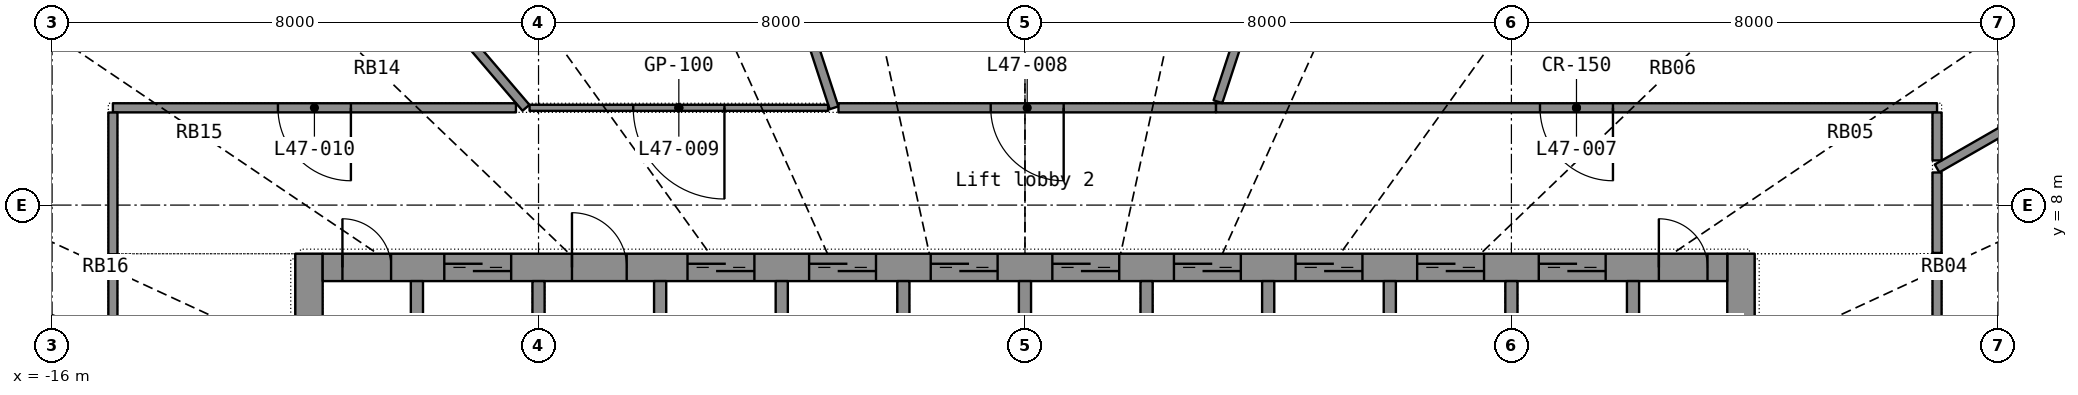
"""IFC4 building model, lengths in metres.
Left out: names, types, materials, properties, quantities, classifications, styles, units other than length and angle.
Written with IfcOpenShell. Run it as: python <this file> out.ifc"""

import sys

from ifc_helpers import new_model, si_unit, direction, frame, frame_2d, origin, place, context, subcontext, project, spatial, rectangle, extrude, element, fill, save


model = new_model("IFC4")
c1 = context("Model", 3, precision=1e-05, world=origin(), true_north=direction((0.0, 1.0)))
c2 = subcontext(c1, "Body", "Model", "MODEL_VIEW")
j1 = project(units=[si_unit("LENGTHUNIT", "METRE"), si_unit("PLANEANGLEUNIT", "RADIAN")], contexts=[c1])
p1 = place(None, origin())
s1 = spatial("IfcSite", under=j1, at=p1, CompositionType="ELEMENT")
p2 = place(p1, origin())
s2 = spatial("IfcBuilding", under=s1, at=p2, CompositionType="ELEMENT")
p3 = place(p2, frame((0.0, 0.0, 194.1)))
s3 = spatial("IfcBuildingStorey", under=s2, at=p3, CompositionType="ELEMENT", Elevation=194.1)
p4 = place(p3, frame((-11.775, -7.2, 0.0), z_axis=(0.0, 0.0, 1.0), x_axis=(0.0, 1.0, 0.0)))
e1 = element("IfcWall", 1, at=p4, inside=s3, PredefinedType="SHEAR", context=c2, shape_type="SweptSolid", body=[
    extrude(rectangle(XDim=14.4, YDim=0.45, at=frame_2d((7.2, 0.0))), origin(), (0.0, 0.0, 1.0), 3.3),
])
p5 = place(p4, frame((6.5, 0.0, 0.0)))
e2 = element("IfcOpeningElement", 2, at=p5, cuts=e1, PredefinedType="OPENING", context=c2, shape_type="SweptSolid", body=[
    extrude(rectangle(XDim=1.4, YDim=2.2, at=frame_2d((0.7, 1.1))), frame((0.0, 0.235, 0.0), z_axis=(0.0, -1.0, 0.0), x_axis=(1.0, 0.0, 0.0)), (0.0, 0.0, 1.0), 0.47),
])
p6 = place(p3, frame((11.775, -7.2, 0.0), z_axis=(0.0, 0.0, 1.0), x_axis=(0.0, 1.0, 0.0)))
e3 = element("IfcWall", 3, at=p6, inside=s3, PredefinedType="SHEAR", context=c2, shape_type="SweptSolid", body=[
    extrude(rectangle(XDim=14.4, YDim=0.45, at=frame_2d((7.2, 0.0))), origin(), (0.0, 0.0, 1.0), 3.3),
])
p7 = place(p6, frame((6.5, 0.0, 0.0)))
e4 = element("IfcOpeningElement", 4, at=p7, cuts=e3, PredefinedType="OPENING", context=c2, shape_type="SweptSolid", body=[
    extrude(rectangle(XDim=1.4, YDim=2.2, at=frame_2d((0.7, 1.1))), frame((0.0, 0.235, 0.0), z_axis=(0.0, -1.0, 0.0), x_axis=(1.0, 0.0, 0.0)), (0.0, 0.0, 1.0), 0.47),
])
p8 = place(p3, frame((-11.55, 6.975, 0.0), z_axis=(0.0, 0.0, 1.0), x_axis=(1.0, 0.0, 0.0)))
e5 = element("IfcWall", 5, at=p8, inside=s3, PredefinedType="SHEAR", context=c2, shape_type="SweptSolid", body=[
    extrude(rectangle(XDim=23.1, YDim=0.45, at=frame_2d((11.55, 0.0))), origin(), (0.0, 0.0, 1.0), 3.3),
])
p9 = place(p8, frame((2.0, 0.0, 0.0)))
e6 = element("IfcOpeningElement", 6, at=p9, cuts=e5, PredefinedType="OPENING", context=c2, shape_type="SweptSolid", body=[
    extrude(rectangle(XDim=1.1, YDim=2.2, at=frame_2d((0.55, 1.1))), frame((0.0, 0.235, 0.0), z_axis=(0.0, -1.0, 0.0), x_axis=(1.0, 0.0, 0.0)), (0.0, 0.0, 1.0), 0.47),
])
p10 = place(p8, frame((6.0, 0.0, 0.0)))
e7 = element("IfcOpeningElement", 7, at=p10, cuts=e5, PredefinedType="OPENING", context=c2, shape_type="SweptSolid", body=[
    extrude(rectangle(XDim=1.1, YDim=2.2, at=frame_2d((0.55, 1.1))), frame((0.0, 0.235, 0.0), z_axis=(0.0, -1.0, 0.0), x_axis=(1.0, 0.0, 0.0)), (0.0, 0.0, 1.0), 0.47),
])
p11 = place(p8, frame((8.0, 0.0, 0.0)))
e8 = element("IfcOpeningElement", 8, at=p11, cuts=e5, PredefinedType="OPENING", context=c2, shape_type="SweptSolid", body=[
    extrude(rectangle(XDim=1.1, YDim=2.2, at=frame_2d((0.55, 1.1))), frame((0.0, 0.235, 0.0), z_axis=(0.0, -1.0, 0.0), x_axis=(1.0, 0.0, 0.0)), (0.0, 0.0, 1.0), 0.47),
])
p12 = place(p8, frame((10.0, 0.0, 0.0)))
e9 = element("IfcOpeningElement", 9, at=p12, cuts=e5, PredefinedType="OPENING", context=c2, shape_type="SweptSolid", body=[
    extrude(rectangle(XDim=1.1, YDim=2.2, at=frame_2d((0.55, 1.1))), frame((0.0, 0.235, 0.0), z_axis=(0.0, -1.0, 0.0), x_axis=(1.0, 0.0, 0.0)), (0.0, 0.0, 1.0), 0.47),
])
p13 = place(p8, frame((12.0, 0.0, 0.0)))
e10 = element("IfcOpeningElement", 10, at=p13, cuts=e5, PredefinedType="OPENING", context=c2, shape_type="SweptSolid", body=[
    extrude(rectangle(XDim=1.1, YDim=2.2, at=frame_2d((0.55, 1.1))), frame((0.0, 0.235, 0.0), z_axis=(0.0, -1.0, 0.0), x_axis=(1.0, 0.0, 0.0)), (0.0, 0.0, 1.0), 0.47),
])
p14 = place(p8, frame((14.0, 0.0, 0.0)))
e11 = element("IfcOpeningElement", 11, at=p14, cuts=e5, PredefinedType="OPENING", context=c2, shape_type="SweptSolid", body=[
    extrude(rectangle(XDim=1.1, YDim=2.2, at=frame_2d((0.55, 1.1))), frame((0.0, 0.235, 0.0), z_axis=(0.0, -1.0, 0.0), x_axis=(1.0, 0.0, 0.0)), (0.0, 0.0, 1.0), 0.47),
])
p15 = place(p8, frame((16.0, 0.0, 0.0)))
e12 = element("IfcOpeningElement", 12, at=p15, cuts=e5, PredefinedType="OPENING", context=c2, shape_type="SweptSolid", body=[
    extrude(rectangle(XDim=1.1, YDim=2.2, at=frame_2d((0.55, 1.1))), frame((0.0, 0.235, 0.0), z_axis=(0.0, -1.0, 0.0), x_axis=(1.0, 0.0, 0.0)), (0.0, 0.0, 1.0), 0.47),
])
p16 = place(p8, frame((18.0, 0.0, 0.0)))
e13 = element("IfcOpeningElement", 13, at=p16, cuts=e5, PredefinedType="OPENING", context=c2, shape_type="SweptSolid", body=[
    extrude(rectangle(XDim=1.1, YDim=2.2, at=frame_2d((0.55, 1.1))), frame((0.0, 0.235, 0.0), z_axis=(0.0, -1.0, 0.0), x_axis=(1.0, 0.0, 0.0)), (0.0, 0.0, 1.0), 0.47),
])
p17 = place(p8, frame((20.0, 0.0, 0.0)))
e14 = element("IfcOpeningElement", 14, at=p17, cuts=e5, PredefinedType="OPENING", context=c2, shape_type="SweptSolid", body=[
    extrude(rectangle(XDim=1.1, YDim=2.2, at=frame_2d((0.55, 1.1))), frame((0.0, 0.235, 0.0), z_axis=(0.0, -1.0, 0.0), x_axis=(1.0, 0.0, 0.0)), (0.0, 0.0, 1.0), 0.47),
])
p18 = place(p8, frame((4.1, 0.0, 0.0)))
e15 = element("IfcOpeningElement", 15, at=p18, cuts=e5, PredefinedType="OPENING", context=c2, shape_type="SweptSolid", body=[
    extrude(rectangle(XDim=0.9, YDim=2.1, at=frame_2d((0.45, 1.05))), frame((0.0, 0.235, 0.0), z_axis=(0.0, -1.0, 0.0), x_axis=(1.0, 0.0, 0.0)), (0.0, 0.0, 1.0), 0.47),
])
p19 = place(p8, frame((0.325, 0.0, 0.0)))
e16 = element("IfcOpeningElement", 16, at=p19, cuts=e5, PredefinedType="OPENING", context=c2, shape_type="SweptSolid", body=[
    extrude(rectangle(XDim=0.8, YDim=2.05, at=frame_2d((0.4, 1.025))), frame((0.0, 0.235, 0.0), z_axis=(0.0, -1.0, 0.0), x_axis=(1.0, 0.0, 0.0)), (0.0, 0.0, 1.0), 0.47),
])
p20 = place(p8, frame((21.975, 0.0, 0.0)))
e17 = element("IfcOpeningElement", 17, at=p20, cuts=e5, PredefinedType="OPENING", context=c2, shape_type="SweptSolid", body=[
    extrude(rectangle(XDim=0.8, YDim=2.05, at=frame_2d((0.4, 1.025))), frame((0.0, 0.235, 0.0), z_axis=(0.0, -1.0, 0.0), x_axis=(1.0, 0.0, 0.0)), (0.0, 0.0, 1.0), 0.47),
])
for number, where, z_axis, x_axis in (
    (18, (-10.0, 3.9, 0.0), (0.0, 0.0, 1.0), (0.0, 1.0, 0.0)),
    (19, (-8.0, 3.9, 0.0), (0.0, 0.0, 1.0), (0.0, 1.0, 0.0)),
    (20, (-6.0, 3.9, 0.0), (0.0, 0.0, 1.0), (0.0, 1.0, 0.0)),
    (21, (-4.0, 3.9, 0.0), (0.0, 0.0, 1.0), (0.0, 1.0, 0.0)),
    (22, (-2.0, 3.9, 0.0), (0.0, 0.0, 1.0), (0.0, 1.0, 0.0)),
    (23, (0.0, 3.9, 0.0), (0.0, 0.0, 1.0), (0.0, 1.0, 0.0)),
    (24, (2.0, 3.9, 0.0), (0.0, 0.0, 1.0), (0.0, 1.0, 0.0)),
    (25, (4.0, 3.9, 0.0), (0.0, 0.0, 1.0), (0.0, 1.0, 0.0)),
    (26, (6.0, 3.9, 0.0), (0.0, 0.0, 1.0), (0.0, 1.0, 0.0)),
    (27, (8.0, 3.9, 0.0), (0.0, 0.0, 1.0), (0.0, 1.0, 0.0)),
    (28, (10.0, 3.9, 0.0), (0.0, 0.0, 1.0), (0.0, 1.0, 0.0)),
):
    element("IfcWall", number, at=place(p3, frame(where, z_axis=z_axis, x_axis=x_axis)), inside=s3, PredefinedType="SHEAR", context=c2, shape_type="SweptSolid", body=[
        extrude(rectangle(XDim=2.85, YDim=0.2, at=frame_2d((1.425, 0.0))), origin(), (0.0, 0.0, 1.0), 3.3),
    ])
p21 = place(p3, frame((15.0, 9.6, 0.0), z_axis=(0.0, 0.0, 1.0), x_axis=(-1.0, 0.0, 0.0)))
e29 = element("IfcWall", 29, at=p21, inside=s3, PredefinedType="PARTITIONING", context=c2, shape_type="SweptSolid", body=[
    extrude(rectangle(XDim=11.86, YDim=0.15, at=frame_2d((5.93, 0.0))), origin(), (0.0, 0.0, 1.0), 2.4),
])
p22 = place(p21, frame((5.33, 0.0, 0.0)))
e30 = element("IfcOpeningElement", 30, at=p22, cuts=e29, PredefinedType="OPENING", context=c2, shape_type="SweptSolid", body=[
    extrude(rectangle(XDim=1.2, YDim=2.2, at=frame_2d((0.6, 1.1))), frame((0.0, 0.085, 0.0), z_axis=(0.0, -1.0, 0.0), x_axis=(1.0, 0.0, 0.0)), (0.0, 0.0, 1.0), 0.17),
])
p23 = place(p3, frame((-5.854, 17.894, 0.0), z_axis=(0.0, 0.0, 1.0), x_axis=(0.310918216, -0.95043667, 0.0)))
e31 = element("IfcWall", 31, at=p23, inside=s3, PredefinedType="PARTITIONING", context=c2, shape_type="SweptSolid", body=[
    extrude(rectangle(XDim=8.726, YDim=0.15, at=frame_2d((4.363, 0.0))), origin(), (0.0, 0.0, 1.0), 2.4),
])
p24 = place(p3, frame((5.853, 17.893, 0.0), z_axis=(0.0, 0.0, 1.0), x_axis=(-0.310929285, -0.950433049, 0.0)))
e32 = element("IfcWall", 32, at=p24, inside=s3, PredefinedType="PARTITIONING", context=c2, shape_type="SweptSolid", body=[
    extrude(rectangle(XDim=8.62, YDim=0.15, at=frame_2d((4.31, 0.0))), origin(), (0.0, 0.0, 1.0), 2.4),
])
p25 = place(p3, frame((-12.975, 15.178, 0.0), z_axis=(0.0, 0.0, 1.0), x_axis=(0.649790761, -0.760113128, 0.0)))
e33 = element("IfcWall", 33, at=p25, inside=s3, PredefinedType="PARTITIONING", context=c2, shape_type="SweptSolid", body=[
    extrude(rectangle(XDim=7.338, YDim=0.15, at=frame_2d((3.669, 0.0))), origin(), (0.0, 0.0, 1.0), 2.4),
])
p26 = place(p3, frame((-8.371, 9.6, 0.0), z_axis=(0.0, 0.0, 1.0), x_axis=(-1.0, 0.0, 0.0)))
e34 = element("IfcWall", 34, at=p26, inside=s3, PredefinedType="PARTITIONING", context=c2, shape_type="SweptSolid", body=[
    extrude(rectangle(XDim=6.629, YDim=0.15, at=frame_2d((3.314, 0.0))), origin(), (0.0, 0.0, 1.0), 2.4),
])
p27 = place(p26, frame((2.714, 0.0, 0.0)))
e35 = element("IfcOpeningElement", 35, at=p27, cuts=e34, PredefinedType="OPENING", context=c2, shape_type="SweptSolid", body=[
    extrude(rectangle(XDim=1.2, YDim=2.2, at=frame_2d((0.6, 1.1))), frame((0.0, 0.085, 0.0), z_axis=(0.0, -1.0, 0.0), x_axis=(1.0, 0.0, 0.0)), (0.0, 0.0, 1.0), 0.17),
])
p28 = place(p3, frame((3.14, 9.6, 0.0), z_axis=(0.0, 0.0, 1.0), x_axis=(-1.0, 0.0, 0.0)))
e36 = element("IfcWall", 36, at=p28, inside=s3, PredefinedType="PARTITIONING", context=c2, shape_type="SweptSolid", body=[
    extrude(rectangle(XDim=6.208, YDim=0.15, at=frame_2d((3.104, 0.0))), origin(), (0.0, 0.0, 1.0), 2.4),
])
p29 = place(p28, frame((2.504, 0.0, 0.0)))
e37 = element("IfcOpeningElement", 37, at=p29, cuts=e36, PredefinedType="OPENING", context=c2, shape_type="SweptSolid", body=[
    extrude(rectangle(XDim=1.2, YDim=2.2, at=frame_2d((0.6, 1.1))), frame((0.0, 0.085, 0.0), z_axis=(0.0, -1.0, 0.0), x_axis=(1.0, 0.0, 0.0)), (0.0, 0.0, 1.0), 0.17),
])
p30 = place(p3, frame((-20.515, 7.836, 0.0), z_axis=(0.0, 0.0, 1.0), x_axis=(0.934186062, -0.356786213, 0.0)))
e38 = element("IfcWall", 38, at=p30, inside=s3, PredefinedType="PARTITIONING", context=c2, shape_type="SweptSolid", body=[
    extrude(rectangle(XDim=5.904, YDim=0.15, at=frame_2d((2.952, 0.0))), origin(), (0.0, 0.0, 1.0), 2.4),
])
p31 = place(p3, frame((15.0, 1.8, 0.0), z_axis=(0.0, 0.0, 1.0), x_axis=(0.0, 1.0, 0.0)))
e39 = element("IfcWall", 39, at=p31, inside=s3, PredefinedType="PARTITIONING", context=c2, shape_type="SweptSolid", body=[
    extrude(rectangle(XDim=5.412, YDim=0.15, at=frame_2d((2.706, 0.0))), origin(), (0.0, 0.0, 1.0), 2.4),
])
p32 = place(p31, frame((2.106, 0.0, 0.0)))
e40 = element("IfcOpeningElement", 40, at=p32, cuts=e39, PredefinedType="OPENING", context=c2, shape_type="SweptSolid", body=[
    extrude(rectangle(XDim=1.2, YDim=2.2, at=frame_2d((0.6, 1.1))), frame((0.0, 0.085, 0.0), z_axis=(0.0, -1.0, 0.0), x_axis=(1.0, 0.0, 0.0)), (0.0, 0.0, 1.0), 0.17),
])
p33 = place(p3, frame((-3.238, 9.6, 0.0), z_axis=(0.0, 0.0, 1.0), x_axis=(-1.0, 0.0, 0.0)))
e41 = element("IfcWall", 41, at=p33, inside=s3, PredefinedType="PARTITIONING", context=c2, shape_type="SweptSolid", body=[
    extrude(rectangle(XDim=4.91, YDim=0.1, at=frame_2d((2.455, 0.0))), origin(), (0.0, 0.0, 1.0), 2.4),
])
p34 = place(p33, frame((1.705, 0.0, 0.0)))
e42 = element("IfcOpeningElement", 42, at=p34, cuts=e41, PredefinedType="OPENING", context=c2, shape_type="SweptSolid", body=[
    extrude(rectangle(XDim=1.5, YDim=2.4, at=frame_2d((0.75, 1.2))), frame((0.0, 0.06, 0.0), z_axis=(0.0, -1.0, 0.0), x_axis=(1.0, 0.0, 0.0)), (0.0, 0.0, 1.0), 0.12),
])
p35 = place(p3, frame((18.537, 10.632, 0.0), z_axis=(0.0, 0.0, 1.0), x_axis=(-0.867438786, -0.49754392, 0.0)))
e43 = element("IfcWall", 43, at=p35, inside=s3, PredefinedType="PARTITIONING", context=c2, shape_type="SweptSolid", body=[
    extrude(rectangle(XDim=4.078, YDim=0.15, at=frame_2d((2.039, 0.0))), origin(), (0.0, 0.0, 1.0), 2.4),
])
p36 = place(p3, frame((-15.0, 9.523, 0.0), z_axis=(0.0, 0.0, 1.0), x_axis=(0.0, -1.0, 0.0)))
e44 = element("IfcWall", 44, at=p36, inside=s3, PredefinedType="PARTITIONING", context=c2, shape_type="SweptSolid", body=[
    extrude(rectangle(XDim=2.335, YDim=0.15, at=frame_2d((1.167, 0.0))), origin(), (0.0, 0.0, 1.0), 2.4),
])
p37 = place(p3, frame((-15.0, 7.187, 0.0), z_axis=(0.0, 0.0, 1.0), x_axis=(0.0, -1.0, 0.0)))
e45 = element("IfcWall", 45, at=p37, inside=s3, PredefinedType="PARTITIONING", context=c2, shape_type="SweptSolid", body=[
    extrude(rectangle(XDim=1.347, YDim=0.15, at=frame_2d((0.673, 0.0))), origin(), (0.0, 0.0, 1.0), 2.4),
])
p38 = place(p3, frame((15.0, 7.213, 0.0), z_axis=(0.0, 0.0, 1.0), x_axis=(0.0, 1.0, 0.0)))
e46 = element("IfcWall", 46, at=p38, inside=s3, PredefinedType="PARTITIONING", context=c2, shape_type="SweptSolid", body=[
    extrude(rectangle(XDim=1.323, YDim=0.15, at=frame_2d((0.662, 0.0))), origin(), (0.0, 0.0, 1.0), 2.4),
])
p39 = place(p3, frame((15.0, 8.735, 0.0), z_axis=(0.0, 0.0, 1.0), x_axis=(0.0, 1.0, 0.0)))
e47 = element("IfcWall", 47, at=p39, inside=s3, PredefinedType="PARTITIONING", context=c2, shape_type="SweptSolid", body=[
    extrude(rectangle(XDim=0.788, YDim=0.15, at=frame_2d((0.394, 0.0))), origin(), (0.0, 0.0, 1.0), 2.4),
])
p40 = place(p9, origin())
e48 = element("IfcDoor", 48, at=p40, inside=s3, OperationType="DOUBLE_DOOR_SLIDING", PredefinedType="DOOR", context=c2, shape_type="SweptSolid", body=[
    extrude(rectangle(XDim=1.1, YDim=2.2, at=frame_2d((0.55, 1.1))), frame((0.0, 0.025, 0.0), z_axis=(0.0, -1.0, 0.0), x_axis=(1.0, 0.0, 0.0)), (0.0, 0.0, 1.0), 0.05),
])
fill(e6, e48)
p41 = place(p10, origin())
e49 = element("IfcDoor", 49, at=p41, inside=s3, OperationType="DOUBLE_DOOR_SLIDING", PredefinedType="DOOR", context=c2, shape_type="SweptSolid", body=[
    extrude(rectangle(XDim=1.1, YDim=2.2, at=frame_2d((0.55, 1.1))), frame((0.0, 0.025, 0.0), z_axis=(0.0, -1.0, 0.0), x_axis=(1.0, 0.0, 0.0)), (0.0, 0.0, 1.0), 0.05),
])
fill(e7, e49)
p42 = place(p11, origin())
e50 = element("IfcDoor", 50, at=p42, inside=s3, OperationType="DOUBLE_DOOR_SLIDING", PredefinedType="DOOR", context=c2, shape_type="SweptSolid", body=[
    extrude(rectangle(XDim=1.1, YDim=2.2, at=frame_2d((0.55, 1.1))), frame((0.0, 0.025, 0.0), z_axis=(0.0, -1.0, 0.0), x_axis=(1.0, 0.0, 0.0)), (0.0, 0.0, 1.0), 0.05),
])
fill(e8, e50)
p43 = place(p12, origin())
e51 = element("IfcDoor", 51, at=p43, inside=s3, OperationType="DOUBLE_DOOR_SLIDING", PredefinedType="DOOR", context=c2, shape_type="SweptSolid", body=[
    extrude(rectangle(XDim=1.1, YDim=2.2, at=frame_2d((0.55, 1.1))), frame((0.0, 0.025, 0.0), z_axis=(0.0, -1.0, 0.0), x_axis=(1.0, 0.0, 0.0)), (0.0, 0.0, 1.0), 0.05),
])
fill(e9, e51)
p44 = place(p13, origin())
e52 = element("IfcDoor", 52, at=p44, inside=s3, OperationType="DOUBLE_DOOR_SLIDING", PredefinedType="DOOR", context=c2, shape_type="SweptSolid", body=[
    extrude(rectangle(XDim=1.1, YDim=2.2, at=frame_2d((0.55, 1.1))), frame((0.0, 0.025, 0.0), z_axis=(0.0, -1.0, 0.0), x_axis=(1.0, 0.0, 0.0)), (0.0, 0.0, 1.0), 0.05),
])
fill(e10, e52)
p45 = place(p14, origin())
e53 = element("IfcDoor", 53, at=p45, inside=s3, OperationType="DOUBLE_DOOR_SLIDING", PredefinedType="DOOR", context=c2, shape_type="SweptSolid", body=[
    extrude(rectangle(XDim=1.1, YDim=2.2, at=frame_2d((0.55, 1.1))), frame((0.0, 0.025, 0.0), z_axis=(0.0, -1.0, 0.0), x_axis=(1.0, 0.0, 0.0)), (0.0, 0.0, 1.0), 0.05),
])
fill(e11, e53)
p46 = place(p15, origin())
e54 = element("IfcDoor", 54, at=p46, inside=s3, OperationType="DOUBLE_DOOR_SLIDING", PredefinedType="DOOR", context=c2, shape_type="SweptSolid", body=[
    extrude(rectangle(XDim=1.1, YDim=2.2, at=frame_2d((0.55, 1.1))), frame((0.0, 0.025, 0.0), z_axis=(0.0, -1.0, 0.0), x_axis=(1.0, 0.0, 0.0)), (0.0, 0.0, 1.0), 0.05),
])
fill(e12, e54)
p47 = place(p16, origin())
e55 = element("IfcDoor", 55, at=p47, inside=s3, OperationType="DOUBLE_DOOR_SLIDING", PredefinedType="DOOR", context=c2, shape_type="SweptSolid", body=[
    extrude(rectangle(XDim=1.1, YDim=2.2, at=frame_2d((0.55, 1.1))), frame((0.0, 0.025, 0.0), z_axis=(0.0, -1.0, 0.0), x_axis=(1.0, 0.0, 0.0)), (0.0, 0.0, 1.0), 0.05),
])
fill(e13, e55)
p48 = place(p17, origin())
e56 = element("IfcDoor", 56, at=p48, inside=s3, OperationType="DOUBLE_DOOR_SLIDING", PredefinedType="DOOR", context=c2, shape_type="SweptSolid", body=[
    extrude(rectangle(XDim=1.1, YDim=2.2, at=frame_2d((0.55, 1.1))), frame((0.0, 0.025, 0.0), z_axis=(0.0, -1.0, 0.0), x_axis=(1.0, 0.0, 0.0)), (0.0, 0.0, 1.0), 0.05),
])
fill(e14, e56)
p49 = place(p18, origin())
e57 = element("IfcDoor", 57, at=p49, inside=s3, OperationType="SINGLE_SWING_LEFT", PredefinedType="DOOR", context=c2, shape_type="SweptSolid", body=[
    extrude(rectangle(XDim=0.9, YDim=2.1, at=frame_2d((0.45, 1.05))), frame((0.0, 0.025, 0.0), z_axis=(0.0, -1.0, 0.0), x_axis=(1.0, 0.0, 0.0)), (0.0, 0.0, 1.0), 0.05),
])
fill(e15, e57)
p50 = place(p19, origin())
e58 = element("IfcDoor", 58, at=p50, inside=s3, OperationType="SINGLE_SWING_LEFT", PredefinedType="DOOR", context=c2, shape_type="SweptSolid", body=[
    extrude(rectangle(XDim=0.8, YDim=2.05, at=frame_2d((0.4, 1.025))), frame((0.0, 0.025, 0.0), z_axis=(0.0, -1.0, 0.0), x_axis=(1.0, 0.0, 0.0)), (0.0, 0.0, 1.0), 0.05),
])
fill(e16, e58)
p51 = place(p20, origin())
e59 = element("IfcDoor", 59, at=p51, inside=s3, OperationType="SINGLE_SWING_LEFT", PredefinedType="DOOR", context=c2, shape_type="SweptSolid", body=[
    extrude(rectangle(XDim=0.8, YDim=2.05, at=frame_2d((0.4, 1.025))), frame((0.0, 0.025, 0.0), z_axis=(0.0, -1.0, 0.0), x_axis=(1.0, 0.0, 0.0)), (0.0, 0.0, 1.0), 0.05),
])
fill(e17, e59)
p52 = place(p22, origin())
e60 = element("IfcDoor", 60, at=p52, inside=s3, OperationType="DOUBLE_DOOR_SINGLE_SWING", PredefinedType="DOOR", context=c2, shape_type="SweptSolid", body=[
    extrude(rectangle(XDim=1.2, YDim=2.2, at=frame_2d((0.6, 1.1))), frame((0.0, 0.025, 0.0), z_axis=(0.0, -1.0, 0.0), x_axis=(1.0, 0.0, 0.0)), (0.0, 0.0, 1.0), 0.05),
])
fill(e30, e60)
p53 = place(p29, origin())
e61 = element("IfcDoor", 61, at=p53, inside=s3, OperationType="DOUBLE_DOOR_SINGLE_SWING", PredefinedType="DOOR", context=c2, shape_type="SweptSolid", body=[
    extrude(rectangle(XDim=1.2, YDim=2.2, at=frame_2d((0.6, 1.1))), frame((0.0, 0.025, 0.0), z_axis=(0.0, -1.0, 0.0), x_axis=(1.0, 0.0, 0.0)), (0.0, 0.0, 1.0), 0.05),
])
fill(e37, e61)
p54 = place(p34, origin())
e62 = element("IfcDoor", 62, at=p54, inside=s3, OperationType="DOUBLE_DOOR_SINGLE_SWING", PredefinedType="DOOR", context=c2, shape_type="SweptSolid", body=[
    extrude(rectangle(XDim=1.5, YDim=2.4, at=frame_2d((0.75, 1.2))), frame((0.0, 0.025, 0.0), z_axis=(0.0, -1.0, 0.0), x_axis=(1.0, 0.0, 0.0)), (0.0, 0.0, 1.0), 0.05),
])
fill(e42, e62)
p55 = place(p27, origin())
e63 = element("IfcDoor", 63, at=p55, inside=s3, OperationType="DOUBLE_DOOR_SINGLE_SWING", PredefinedType="DOOR", context=c2, shape_type="SweptSolid", body=[
    extrude(rectangle(XDim=1.2, YDim=2.2, at=frame_2d((0.6, 1.1))), frame((0.0, 0.025, 0.0), z_axis=(0.0, -1.0, 0.0), x_axis=(1.0, 0.0, 0.0)), (0.0, 0.0, 1.0), 0.05),
])
fill(e35, e63)
save(model, sys.argv[1])
